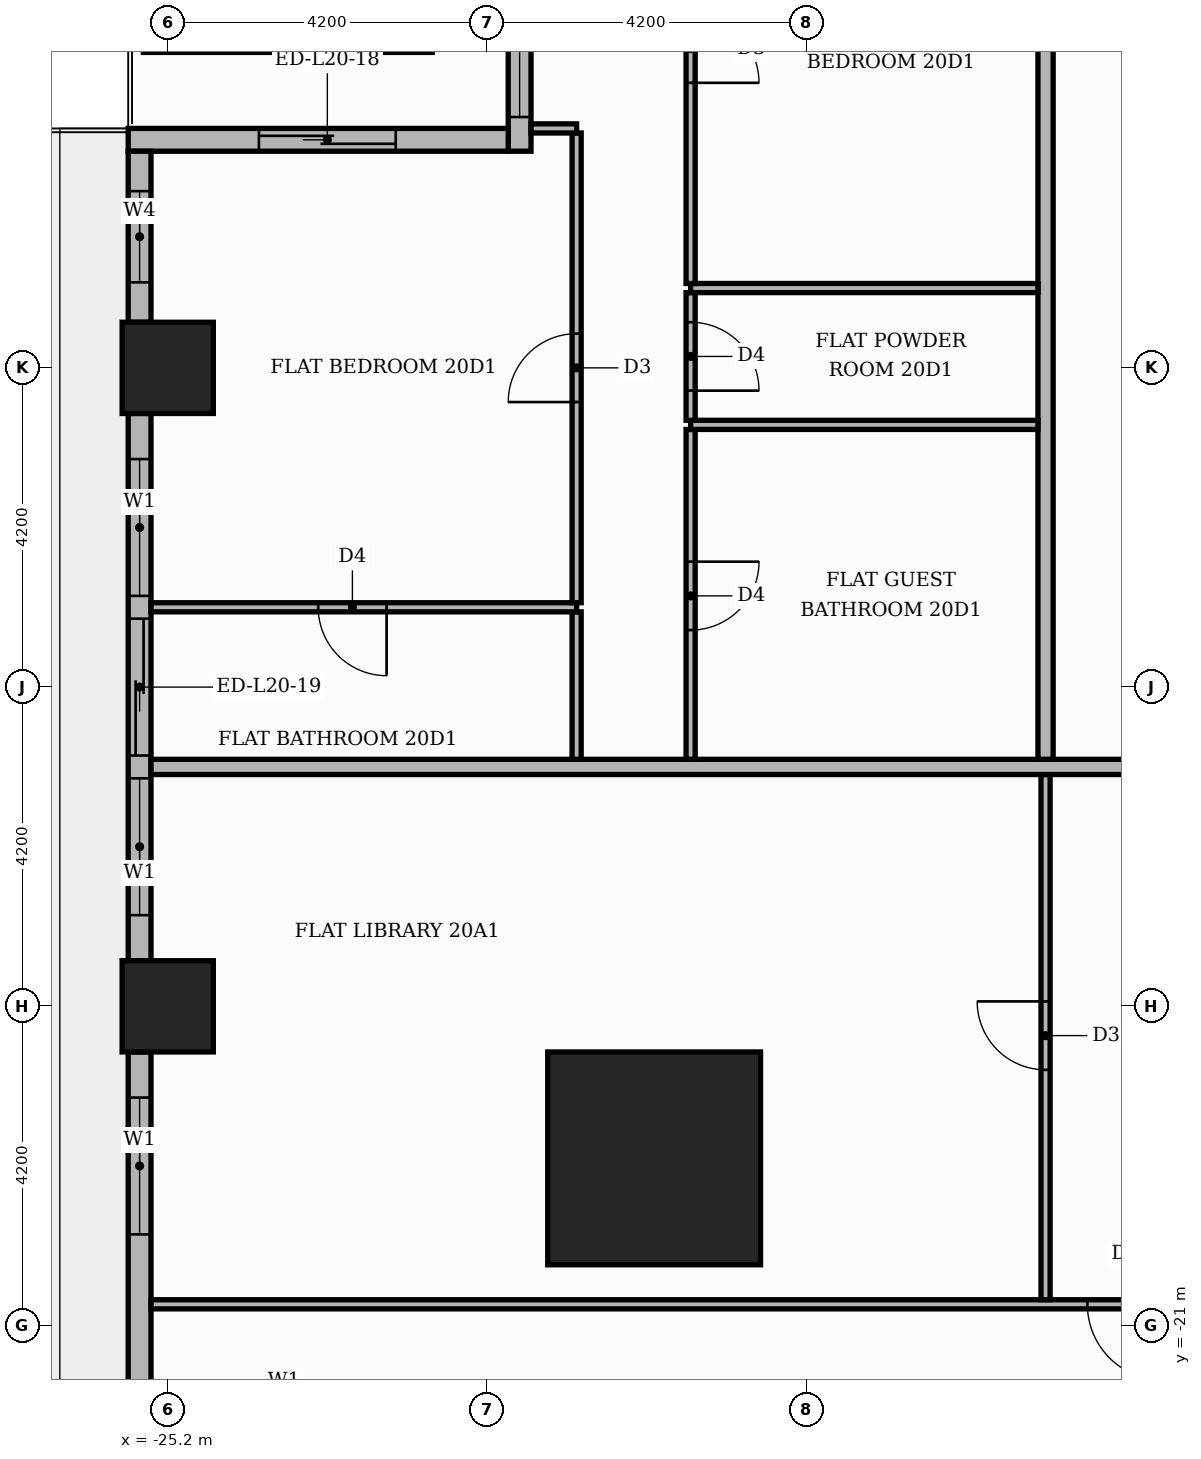
"""IFC4 building model, lengths in metres.
Left out: names, types, materials, properties, quantities, classifications, styles, units other than length and angle.
Written with IfcOpenShell. Run it as: python <this file> out.ifc"""

import sys

from ifc_helpers import new_model, si_unit, direction, frame, frame_2d, origin, origin_2d, place, context, subcontext, project, spatial, rectangle, extrude, element, fill, save


model = new_model("IFC4")
c1 = context("Model", 3, precision=1e-05, world=origin(), true_north=direction((0.0, 1.0)))
c2 = subcontext(c1, "Body", "Model", "MODEL_VIEW")
j1 = project(units=[si_unit("LENGTHUNIT", "METRE"), si_unit("PLANEANGLEUNIT", "RADIAN")], contexts=[c1])
p1 = place(None, origin())
s1 = spatial("IfcSite", under=j1, at=p1, CompositionType="ELEMENT")
p2 = place(p1, origin())
s2 = spatial("IfcBuilding", under=s1, at=p2, CompositionType="ELEMENT")
p3 = place(p2, frame((0.0, 0.0, 87.0)))
s3 = spatial("IfcBuildingStorey", under=s2, at=p3, CompositionType="ELEMENT", Elevation=87.0)
p4 = place(p3, frame((-18.8, -18.8, 0.0), z_axis=(0.0, 0.0, 1.0), x_axis=(1.0, 0.0, 0.0)))
e1 = element("IfcColumn", 1, at=p4, inside=s3, PredefinedType="COLUMN", context=c2, shape_type="SweptSolid", body=[
    extrude(rectangle(XDim=2.8, YDim=2.8, at=origin_2d()), origin(), (0.0, 0.0, 1.0), 3.9),
])
for number, where, z_axis, x_axis in (
    (2, (-25.2, -8.4, 0.0), (0.0, 0.0, 1.0), (1.0, 0.0, 0.0)),
    (3, (-25.2, -16.8, 0.0), (0.0, 0.0, 1.0), (1.0, 0.0, 0.0)),
):
    element("IfcColumn", number, at=place(p3, frame(where, z_axis=z_axis, x_axis=x_axis)), inside=s3, PredefinedType="COLUMN", context=c2, shape_type="SweptSolid", body=[
        extrude(rectangle(XDim=1.2, YDim=1.2, at=origin_2d()), origin(), (0.0, 0.0, 1.0), 3.9),
    ])
p5 = place(p3, frame((-20.57, 5.25, 0.0), z_axis=(0.0, 0.0, 1.0), x_axis=(0.0, -1.0, 0.0)))
e4 = element("IfcWall", 4, at=p5, inside=s3, PredefinedType="STANDARD", context=c2, shape_type="SweptSolid", body=[
    extrude(rectangle(XDim=10.8, YDim=0.3, at=frame_2d((5.4, 0.0))), origin(), (0.0, 0.0, 1.0), 3.48),
])
p6 = place(p5, frame((0.15, 0.0, 0.9)))
e5 = element("IfcOpeningElement", 5, at=p6, cuts=e4, PredefinedType="OPENING", context=c2, shape_type="SweptSolid", body=[
    extrude(rectangle(XDim=6.0, YDim=2.1, at=frame_2d((3.0, 1.05))), frame((0.0, 0.16, 0.0), z_axis=(0.0, -1.0, 0.0), x_axis=(1.0, 0.0, 0.0)), (0.0, 0.0, 1.0), 0.32),
])
p7 = place(p5, frame((6.45, 0.0, 0.9)))
e6 = element("IfcOpeningElement", 6, at=p7, cuts=e4, PredefinedType="OPENING", context=c2, shape_type="SweptSolid", body=[
    extrude(rectangle(XDim=3.9, YDim=2.1, at=frame_2d((1.95, 1.05))), frame((0.0, 0.16, 0.0), z_axis=(0.0, -1.0, 0.0), x_axis=(1.0, 0.0, 0.0)), (0.0, 0.0, 1.0), 0.32),
])
p8 = place(p3, frame((-20.72, -5.4, 0.0), z_axis=(0.0, 0.0, 1.0), x_axis=(-1.0, 0.0, 0.0)))
e7 = element("IfcWall", 7, at=p8, inside=s3, PredefinedType="STANDARD", context=c2, shape_type="SweptSolid", body=[
    extrude(rectangle(XDim=5.0, YDim=0.3, at=frame_2d((2.5, 0.0))), origin(), (0.0, 0.0, 1.0), 3.48),
])
p9 = place(p8, frame((1.48, 0.0, 0.0)))
e8 = element("IfcOpeningElement", 8, at=p9, cuts=e7, PredefinedType="OPENING", context=c2, shape_type="SweptSolid", body=[
    extrude(rectangle(XDim=1.8, YDim=2.4, at=frame_2d((0.9, 1.2))), frame((0.0, 0.16, 0.0), z_axis=(0.0, -1.0, 0.0), x_axis=(1.0, 0.0, 0.0)), (0.0, 0.0, 1.0), 0.32),
])
p10 = place(p3, frame((-25.57, -5.55, 0.0), z_axis=(0.0, 0.0, 1.0), x_axis=(0.0, -1.0, 0.0)))
e9 = element("IfcWall", 9, at=p10, inside=s3, PredefinedType="STANDARD", context=c2, shape_type="SweptSolid", body=[
    extrude(rectangle(XDim=2.25, YDim=0.3, at=frame_2d((1.125, 0.0))), origin(), (0.0, 0.0, 1.0), 3.48),
])
p11 = place(p10, frame((0.525, 0.0, 0.9)))
e10 = element("IfcOpeningElement", 10, at=p11, cuts=e9, PredefinedType="OPENING", context=c2, shape_type="SweptSolid", body=[
    extrude(rectangle(XDim=1.2, YDim=2.1, at=frame_2d((0.6, 1.05))), frame((0.0, 0.16, 0.0), z_axis=(0.0, -1.0, 0.0), x_axis=(1.0, 0.0, 0.0)), (0.0, 0.0, 1.0), 0.32),
])
p12 = place(p3, frame((-25.57, -9.0, 0.0), z_axis=(0.0, 0.0, 1.0), x_axis=(0.0, -1.0, 0.0)))
e11 = element("IfcWall", 11, at=p12, inside=s3, PredefinedType="STANDARD", context=c2, shape_type="SweptSolid", body=[
    extrude(rectangle(XDim=7.2, YDim=0.3, at=frame_2d((3.6, 0.0))), origin(), (0.0, 0.0, 1.0), 3.48),
])
p13 = place(p12, frame((0.6, 0.0, 0.9)))
e12 = element("IfcOpeningElement", 12, at=p13, cuts=e11, PredefinedType="OPENING", context=c2, shape_type="SweptSolid", body=[
    extrude(rectangle(XDim=1.8, YDim=2.1, at=frame_2d((0.9, 1.05))), frame((0.0, 0.16, 0.0), z_axis=(0.0, -1.0, 0.0), x_axis=(1.0, 0.0, 0.0)), (0.0, 0.0, 1.0), 0.32),
])
p14 = place(p12, frame((2.7, 0.0, 0.0)))
e13 = element("IfcOpeningElement", 13, at=p14, cuts=e11, PredefinedType="OPENING", context=c2, shape_type="SweptSolid", body=[
    extrude(rectangle(XDim=1.8, YDim=2.4, at=frame_2d((0.9, 1.2))), frame((0.0, 0.16, 0.0), z_axis=(0.0, -1.0, 0.0), x_axis=(1.0, 0.0, 0.0)), (0.0, 0.0, 1.0), 0.32),
])
p15 = place(p12, frame((4.8, 0.0, 0.9)))
e14 = element("IfcOpeningElement", 14, at=p15, cuts=e11, PredefinedType="OPENING", context=c2, shape_type="SweptSolid", body=[
    extrude(rectangle(XDim=1.8, YDim=2.1, at=frame_2d((0.9, 1.05))), frame((0.0, 0.16, 0.0), z_axis=(0.0, -1.0, 0.0), x_axis=(1.0, 0.0, 0.0)), (0.0, 0.0, 1.0), 0.32),
])
p16 = place(p3, frame((-25.57, -17.4, 0.0), z_axis=(0.0, 0.0, 1.0), x_axis=(0.0, -1.0, 0.0)))
e15 = element("IfcWall", 15, at=p16, inside=s3, PredefinedType="STANDARD", context=c2, shape_type="SweptSolid", body=[
    extrude(rectangle(XDim=4.82, YDim=0.3, at=frame_2d((2.41, 0.0))), origin(), (0.0, 0.0, 1.0), 3.48),
])
p17 = place(p16, frame((0.6, 0.0, 0.9)))
e16 = element("IfcOpeningElement", 16, at=p17, cuts=e15, PredefinedType="OPENING", context=c2, shape_type="SweptSolid", body=[
    extrude(rectangle(XDim=1.8, YDim=2.1, at=frame_2d((0.9, 1.05))), frame((0.0, 0.16, 0.0), z_axis=(0.0, -1.0, 0.0), x_axis=(1.0, 0.0, 0.0)), (0.0, 0.0, 1.0), 0.32),
])
p18 = place(p3, frame((-25.42, -20.72, 0.0), z_axis=(0.0, 0.0, 1.0), x_axis=(1.0, 0.0, 0.0)))
e17 = element("IfcWall", 17, at=p18, inside=s3, PredefinedType="PARTITIONING", context=c2, shape_type="SweptSolid", body=[
    extrude(rectangle(XDim=38.97, YDim=0.12, at=frame_2d((19.485, 0.0))), origin(), (0.0, 0.0, 1.0), 3.48),
])
p19 = place(p18, frame((12.32, 0.0, 0.0)))
e18 = element("IfcOpeningElement", 18, at=p19, cuts=e17, PredefinedType="OPENING", context=c2, shape_type="SweptSolid", body=[
    extrude(rectangle(XDim=1.0, YDim=2.1, at=frame_2d((0.5, 1.05))), frame((0.0, 0.07, 0.0), z_axis=(0.0, -1.0, 0.0), x_axis=(1.0, 0.0, 0.0)), (0.0, 0.0, 1.0), 0.14),
])
p20 = place(p18, frame((16.52, 0.0, 0.0)))
e19 = element("IfcOpeningElement", 19, at=p20, cuts=e17, PredefinedType="OPENING", context=c2, shape_type="SweptSolid", body=[
    extrude(rectangle(XDim=1.0, YDim=2.1, at=frame_2d((0.5, 1.05))), frame((0.0, 0.07, 0.0), z_axis=(0.0, -1.0, 0.0), x_axis=(1.0, 0.0, 0.0)), (0.0, 0.0, 1.0), 0.14),
])
p21 = place(p18, frame((23.92, 0.0, 0.0)))
e20 = element("IfcOpeningElement", 20, at=p21, cuts=e17, PredefinedType="OPENING", context=c2, shape_type="SweptSolid", body=[
    extrude(rectangle(XDim=0.9, YDim=2.1, at=frame_2d((0.45, 1.05))), frame((0.0, 0.07, 0.0), z_axis=(0.0, -1.0, 0.0), x_axis=(1.0, 0.0, 0.0)), (0.0, 0.0, 1.0), 0.14),
])
p22 = place(p18, frame((34.42, 0.0, 0.0)))
e21 = element("IfcOpeningElement", 21, at=p22, cuts=e17, PredefinedType="OPENING", context=c2, shape_type="SweptSolid", body=[
    extrude(rectangle(XDim=0.9, YDim=2.1, at=frame_2d((0.45, 1.05))), frame((0.0, 0.07, 0.0), z_axis=(0.0, -1.0, 0.0), x_axis=(1.0, 0.0, 0.0)), (0.0, 0.0, 1.0), 0.14),
])
p23 = place(p3, frame((-13.65, -20.66, 0.0), z_axis=(0.0, 0.0, 1.0), x_axis=(0.0, 1.0, 0.0)))
e22 = element("IfcWall", 22, at=p23, inside=s3, PredefinedType="PARTITIONING", context=c2, shape_type="SweptSolid", body=[
    extrude(rectangle(XDim=6.91, YDim=0.12, at=frame_2d((3.455, 0.0))), origin(), (0.0, 0.0, 1.0), 3.48),
])
p24 = place(p23, frame((3.025, 0.0, 0.0)))
e23 = element("IfcOpeningElement", 23, at=p24, cuts=e22, PredefinedType="OPENING", context=c2, shape_type="SweptSolid", body=[
    extrude(rectangle(XDim=0.9, YDim=2.1, at=frame_2d((0.45, 1.05))), frame((0.0, 0.07, 0.0), z_axis=(0.0, -1.0, 0.0), x_axis=(1.0, 0.0, 0.0)), (0.0, 0.0, 1.0), 0.14),
])
p25 = place(p3, frame((-25.42, -13.65, 0.0), z_axis=(0.0, 0.0, 1.0), x_axis=(1.0, 0.0, 0.0)))
e24 = element("IfcWall", 24, at=p25, inside=s3, PredefinedType="PARTITIONING", context=c2, shape_type="SweptSolid", body=[
    extrude(rectangle(XDim=39.07, YDim=0.2, at=frame_2d((19.535, 0.0))), origin(), (0.0, 0.0, 1.0), 3.48),
])
p26 = place(p25, frame((14.37, 0.0, 0.0)))
e25 = element("IfcOpeningElement", 25, at=p26, cuts=e24, PredefinedType="OPENING", context=c2, shape_type="SweptSolid", body=[
    extrude(rectangle(XDim=1.1, YDim=2.4, at=frame_2d((0.55, 1.2))), frame((0.0, 0.11, 0.0), z_axis=(0.0, -1.0, 0.0), x_axis=(1.0, 0.0, 0.0)), (0.0, 0.0, 1.0), 0.22),
])
p27 = place(p3, frame((-19.82, -13.55, 0.0), z_axis=(0.0, 0.0, 1.0), x_axis=(0.0, 1.0, 0.0)))
e26 = element("IfcWall", 26, at=p27, inside=s3, PredefinedType="PARTITIONING", context=c2, shape_type="SweptSolid", body=[
    extrude(rectangle(XDim=1.94, YDim=0.12, at=frame_2d((0.97, 0.0))), origin(), (0.0, 0.0, 1.0), 3.48),
])
p28 = place(p3, frame((-18.32, -13.55, 0.0), z_axis=(0.0, 0.0, 1.0), x_axis=(0.0, 1.0, 0.0)))
e27 = element("IfcWall", 27, at=p28, inside=s3, PredefinedType="PARTITIONING", context=c2, shape_type="SweptSolid", body=[
    extrude(rectangle(XDim=4.34, YDim=0.12, at=frame_2d((2.17, 0.0))), origin(), (0.0, 0.0, 1.0), 3.48),
])
p29 = place(p28, frame((1.7, 0.0, 0.0)))
e28 = element("IfcOpeningElement", 28, at=p29, cuts=e27, PredefinedType="OPENING", context=c2, shape_type="SweptSolid", body=[
    extrude(rectangle(XDim=0.9, YDim=2.1, at=frame_2d((0.45, 1.05))), frame((0.0, 0.07, 0.0), z_axis=(0.0, -1.0, 0.0), x_axis=(1.0, 0.0, 0.0)), (0.0, 0.0, 1.0), 0.14),
])
p30 = place(p3, frame((-13.65, -13.55, 0.0), z_axis=(0.0, 0.0, 1.0), x_axis=(0.0, 1.0, 0.0)))
e29 = element("IfcWall", 29, at=p30, inside=s3, PredefinedType="PARTITIONING", context=c2, shape_type="SweptSolid", body=[
    extrude(rectangle(XDim=27.1, YDim=0.2, at=frame_2d((13.55, 0.0))), origin(), (0.0, 0.0, 1.0), 3.48),
])
p31 = place(p30, frame((24.55, 0.0, 0.0)))
e30 = element("IfcOpeningElement", 30, at=p31, cuts=e29, PredefinedType="OPENING", context=c2, shape_type="SweptSolid", body=[
    extrude(rectangle(XDim=1.1, YDim=2.4, at=frame_2d((0.55, 1.2))), frame((0.0, 0.11, 0.0), z_axis=(0.0, -1.0, 0.0), x_axis=(1.0, 0.0, 0.0)), (0.0, 0.0, 1.0), 0.22),
])
p32 = place(p3, frame((-25.42, -11.55, 0.0), z_axis=(0.0, 0.0, 1.0), x_axis=(1.0, 0.0, 0.0)))
e31 = element("IfcWall", 31, at=p32, inside=s3, PredefinedType="PARTITIONING", context=c2, shape_type="SweptSolid", body=[
    extrude(rectangle(XDim=5.6, YDim=0.12, at=frame_2d((2.8, 0.0))), origin(), (0.0, 0.0, 1.0), 3.48),
])
p33 = place(p32, frame((2.2, 0.0, 0.0)))
e32 = element("IfcOpeningElement", 32, at=p33, cuts=e31, PredefinedType="OPENING", context=c2, shape_type="SweptSolid", body=[
    extrude(rectangle(XDim=0.9, YDim=2.1, at=frame_2d((0.45, 1.05))), frame((0.0, 0.07, 0.0), z_axis=(0.0, -1.0, 0.0), x_axis=(1.0, 0.0, 0.0)), (0.0, 0.0, 1.0), 0.14),
])
p34 = place(p3, frame((-19.82, -11.49, 0.0), z_axis=(0.0, 0.0, 1.0), x_axis=(0.0, 1.0, 0.0)))
e33 = element("IfcWall", 33, at=p34, inside=s3, PredefinedType="PARTITIONING", context=c2, shape_type="SweptSolid", body=[
    extrude(rectangle(XDim=6.18, YDim=0.12, at=frame_2d((3.09, 0.0))), origin(), (0.0, 0.0, 1.0), 3.48),
])
p35 = place(p34, frame((2.64, 0.0, 0.0)))
e34 = element("IfcOpeningElement", 34, at=p35, cuts=e33, PredefinedType="OPENING", context=c2, shape_type="SweptSolid", body=[
    extrude(rectangle(XDim=0.9, YDim=2.1, at=frame_2d((0.45, 1.05))), frame((0.0, 0.07, 0.0), z_axis=(0.0, -1.0, 0.0), x_axis=(1.0, 0.0, 0.0)), (0.0, 0.0, 1.0), 0.14),
])
p36 = place(p3, frame((-18.32, -9.15, 0.0), z_axis=(0.0, 0.0, 1.0), x_axis=(1.0, 0.0, 0.0)))
e35 = element("IfcWall", 35, at=p36, inside=s3, PredefinedType="PARTITIONING", context=c2, shape_type="SweptSolid", body=[
    extrude(rectangle(XDim=4.57, YDim=0.12, at=frame_2d((2.285, 0.0))), origin(), (0.0, 0.0, 1.0), 3.48),
])
p37 = place(p3, frame((-18.32, -9.09, 0.0), z_axis=(0.0, 0.0, 1.0), x_axis=(0.0, 1.0, 0.0)))
e36 = element("IfcWall", 36, at=p37, inside=s3, PredefinedType="PARTITIONING", context=c2, shape_type="SweptSolid", body=[
    extrude(rectangle(XDim=1.68, YDim=0.12, at=frame_2d((0.84, 0.0))), origin(), (0.0, 0.0, 1.0), 3.48),
])
p38 = place(p37, frame((0.39, 0.0, 0.0)))
e37 = element("IfcOpeningElement", 37, at=p38, cuts=e36, PredefinedType="OPENING", context=c2, shape_type="SweptSolid", body=[
    extrude(rectangle(XDim=0.9, YDim=2.1, at=frame_2d((0.45, 1.05))), frame((0.0, 0.07, 0.0), z_axis=(0.0, -1.0, 0.0), x_axis=(1.0, 0.0, 0.0)), (0.0, 0.0, 1.0), 0.14),
])
p39 = place(p3, frame((-18.32, -7.35, 0.0), z_axis=(0.0, 0.0, 1.0), x_axis=(1.0, 0.0, 0.0)))
e38 = element("IfcWall", 38, at=p39, inside=s3, PredefinedType="PARTITIONING", context=c2, shape_type="SweptSolid", body=[
    extrude(rectangle(XDim=4.57, YDim=0.12, at=frame_2d((2.285, 0.0))), origin(), (0.0, 0.0, 1.0), 3.48),
])
p40 = place(p3, frame((-18.32, -7.29, 0.0), z_axis=(0.0, 0.0, 1.0), x_axis=(0.0, 1.0, 0.0)))
e39 = element("IfcWall", 39, at=p40, inside=s3, PredefinedType="PARTITIONING", context=c2, shape_type="SweptSolid", body=[
    extrude(rectangle(XDim=6.18, YDim=0.12, at=frame_2d((3.09, 0.0))), origin(), (0.0, 0.0, 1.0), 3.48),
])
p41 = place(p40, frame((2.64, 0.0, 0.0)))
e40 = element("IfcOpeningElement", 40, at=p41, cuts=e39, PredefinedType="OPENING", context=c2, shape_type="SweptSolid", body=[
    extrude(rectangle(XDim=0.9, YDim=2.1, at=frame_2d((0.45, 1.05))), frame((0.0, 0.07, 0.0), z_axis=(0.0, -1.0, 0.0), x_axis=(1.0, 0.0, 0.0)), (0.0, 0.0, 1.0), 0.14),
])
p42 = place(p3, frame((-20.42, -5.25, 0.0), z_axis=(0.0, 0.0, 1.0), x_axis=(1.0, 0.0, 0.0)))
e41 = element("IfcWall", 41, at=p42, inside=s3, PredefinedType="PARTITIONING", context=c2, shape_type="SweptSolid", body=[
    extrude(rectangle(XDim=0.6, YDim=0.12, at=frame_2d((0.3, 0.0))), origin(), (0.0, 0.0, 1.0), 3.48),
])
p43 = place(p7, origin())
e42 = element("IfcWindow", 42, at=p43, inside=s3, PartitioningType="SINGLE_PANEL", PredefinedType="WINDOW", context=c2, shape_type="SweptSolid", body=[
    extrude(rectangle(XDim=3.9, YDim=2.1, at=frame_2d((1.95, 1.05))), frame((0.0, 0.03, 0.0), z_axis=(0.0, -1.0, 0.0), x_axis=(1.0, 0.0, 0.0)), (0.0, 0.0, 1.0), 0.06),
])
fill(e6, e42)
p44 = place(p9, origin())
e43 = element("IfcDoor", 43, at=p44, inside=s3, OperationType="SLIDING_TO_RIGHT", PredefinedType="DOOR", context=c2, shape_type="SweptSolid", body=[
    extrude(rectangle(XDim=1.8, YDim=2.4, at=frame_2d((0.9, 1.2))), frame((0.0, 0.025, 0.0), z_axis=(0.0, -1.0, 0.0), x_axis=(1.0, 0.0, 0.0)), (0.0, 0.0, 1.0), 0.05),
])
fill(e8, e43)
p45 = place(p11, origin())
e44 = element("IfcWindow", 44, at=p45, inside=s3, PartitioningType="SINGLE_PANEL", PredefinedType="WINDOW", context=c2, shape_type="SweptSolid", body=[
    extrude(rectangle(XDim=1.2, YDim=2.1, at=frame_2d((0.6, 1.05))), frame((0.0, 0.03, 0.0), z_axis=(0.0, -1.0, 0.0), x_axis=(1.0, 0.0, 0.0)), (0.0, 0.0, 1.0), 0.06),
])
fill(e10, e44)
p46 = place(p13, origin())
e45 = element("IfcWindow", 45, at=p46, inside=s3, PartitioningType="SINGLE_PANEL", PredefinedType="WINDOW", context=c2, shape_type="SweptSolid", body=[
    extrude(rectangle(XDim=1.8, YDim=2.1, at=frame_2d((0.9, 1.05))), frame((0.0, 0.03, 0.0), z_axis=(0.0, -1.0, 0.0), x_axis=(1.0, 0.0, 0.0)), (0.0, 0.0, 1.0), 0.06),
])
fill(e12, e45)
p47 = place(p14, origin())
e46 = element("IfcDoor", 46, at=p47, inside=s3, OperationType="SLIDING_TO_RIGHT", PredefinedType="DOOR", context=c2, shape_type="SweptSolid", body=[
    extrude(rectangle(XDim=1.8, YDim=2.4, at=frame_2d((0.9, 1.2))), frame((0.0, 0.025, 0.0), z_axis=(0.0, -1.0, 0.0), x_axis=(1.0, 0.0, 0.0)), (0.0, 0.0, 1.0), 0.05),
])
fill(e13, e46)
p48 = place(p15, origin())
e47 = element("IfcWindow", 47, at=p48, inside=s3, PartitioningType="SINGLE_PANEL", PredefinedType="WINDOW", context=c2, shape_type="SweptSolid", body=[
    extrude(rectangle(XDim=1.8, YDim=2.1, at=frame_2d((0.9, 1.05))), frame((0.0, 0.03, 0.0), z_axis=(0.0, -1.0, 0.0), x_axis=(1.0, 0.0, 0.0)), (0.0, 0.0, 1.0), 0.06),
])
fill(e14, e47)
p49 = place(p17, origin())
e48 = element("IfcWindow", 48, at=p49, inside=s3, PartitioningType="SINGLE_PANEL", PredefinedType="WINDOW", context=c2, shape_type="SweptSolid", body=[
    extrude(rectangle(XDim=1.8, YDim=2.1, at=frame_2d((0.9, 1.05))), frame((0.0, 0.03, 0.0), z_axis=(0.0, -1.0, 0.0), x_axis=(1.0, 0.0, 0.0)), (0.0, 0.0, 1.0), 0.06),
])
fill(e16, e48)
p50 = place(p24, origin())
e49 = element("IfcDoor", 49, at=p50, inside=s3, OperationType="SINGLE_SWING_RIGHT", PredefinedType="DOOR", context=c2, shape_type="SweptSolid", body=[
    extrude(rectangle(XDim=0.9, YDim=2.1, at=frame_2d((0.45, 1.05))), frame((0.0, 0.025, 0.0), z_axis=(0.0, -1.0, 0.0), x_axis=(1.0, 0.0, 0.0)), (0.0, 0.0, 1.0), 0.05),
])
fill(e23, e49)
p51 = place(p19, frame((1.0, 0.0, 0.0), z_axis=(0.0, 0.0, 1.0), x_axis=(-1.0, 0.0, 0.0)))
e50 = element("IfcDoor", 50, at=p51, inside=s3, OperationType="SINGLE_SWING_RIGHT", PredefinedType="DOOR", context=c2, shape_type="SweptSolid", body=[
    extrude(rectangle(XDim=1.0, YDim=2.1, at=frame_2d((0.5, 1.05))), frame((0.0, 0.025, 0.0), z_axis=(0.0, -1.0, 0.0), x_axis=(1.0, 0.0, 0.0)), (0.0, 0.0, 1.0), 0.05),
])
fill(e18, e50)
p52 = place(p41, frame((0.9, 0.0, 0.0), z_axis=(0.0, 0.0, 1.0), x_axis=(-1.0, 0.0, 0.0)))
e51 = element("IfcDoor", 51, at=p52, inside=s3, OperationType="SINGLE_SWING_LEFT", PredefinedType="DOOR", context=c2, shape_type="SweptSolid", body=[
    extrude(rectangle(XDim=0.9, YDim=2.1, at=frame_2d((0.45, 1.05))), frame((0.0, 0.025, 0.0), z_axis=(0.0, -1.0, 0.0), x_axis=(1.0, 0.0, 0.0)), (0.0, 0.0, 1.0), 0.05),
])
fill(e40, e51)
p53 = place(p38, frame((0.9, 0.0, 0.0), z_axis=(0.0, 0.0, 1.0), x_axis=(-1.0, 0.0, 0.0)))
e52 = element("IfcDoor", 52, at=p53, inside=s3, OperationType="SINGLE_SWING_LEFT", PredefinedType="DOOR", context=c2, shape_type="SweptSolid", body=[
    extrude(rectangle(XDim=0.9, YDim=2.1, at=frame_2d((0.45, 1.05))), frame((0.0, 0.025, 0.0), z_axis=(0.0, -1.0, 0.0), x_axis=(1.0, 0.0, 0.0)), (0.0, 0.0, 1.0), 0.05),
])
fill(e37, e52)
p54 = place(p29, frame((0.9, 0.0, 0.0), z_axis=(0.0, 0.0, 1.0), x_axis=(-1.0, 0.0, 0.0)))
e53 = element("IfcDoor", 53, at=p54, inside=s3, OperationType="SINGLE_SWING_RIGHT", PredefinedType="DOOR", context=c2, shape_type="SweptSolid", body=[
    extrude(rectangle(XDim=0.9, YDim=2.1, at=frame_2d((0.45, 1.05))), frame((0.0, 0.025, 0.0), z_axis=(0.0, -1.0, 0.0), x_axis=(1.0, 0.0, 0.0)), (0.0, 0.0, 1.0), 0.05),
])
fill(e28, e53)
p55 = place(p35, origin())
e54 = element("IfcDoor", 54, at=p55, inside=s3, OperationType="SINGLE_SWING_LEFT", PredefinedType="DOOR", context=c2, shape_type="SweptSolid", body=[
    extrude(rectangle(XDim=0.9, YDim=2.1, at=frame_2d((0.45, 1.05))), frame((0.0, 0.025, 0.0), z_axis=(0.0, -1.0, 0.0), x_axis=(1.0, 0.0, 0.0)), (0.0, 0.0, 1.0), 0.05),
])
fill(e34, e54)
p56 = place(p33, frame((0.9, 0.0, 0.0), z_axis=(0.0, 0.0, 1.0), x_axis=(-1.0, 0.0, 0.0)))
e55 = element("IfcDoor", 55, at=p56, inside=s3, OperationType="SINGLE_SWING_RIGHT", PredefinedType="DOOR", context=c2, shape_type="SweptSolid", body=[
    extrude(rectangle(XDim=0.9, YDim=2.1, at=frame_2d((0.45, 1.05))), frame((0.0, 0.025, 0.0), z_axis=(0.0, -1.0, 0.0), x_axis=(1.0, 0.0, 0.0)), (0.0, 0.0, 1.0), 0.05),
])
fill(e32, e55)
save(model, sys.argv[1])
